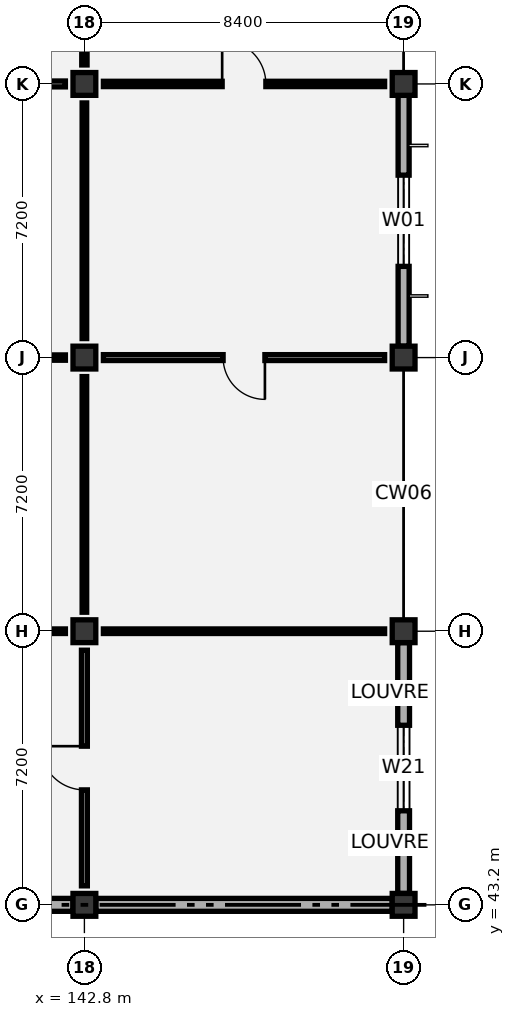
"""IFC4 building model, lengths in metres.
Left out: names, types, materials, properties, quantities, classifications, styles, units other than length and angle.
Written with IfcOpenShell. Run it as: python <this file> out.ifc"""

import sys

from ifc_helpers import new_model, si_unit, direction, frame, frame_2d, origin, origin_2d, place, context, subcontext, project, spatial, rectangle, extrude, element, fill, save


model = new_model("IFC4")
c1 = context("Model", 3, precision=1e-05, world=origin(), true_north=direction((0.0, 1.0)))
c2 = subcontext(c1, "Body", "Model", "MODEL_VIEW")
j1 = project(units=[si_unit("LENGTHUNIT", "METRE"), si_unit("PLANEANGLEUNIT", "RADIAN")], contexts=[c1])
p1 = place(None, origin())
s1 = spatial("IfcSite", under=j1, at=p1, CompositionType="ELEMENT")
p2 = place(p1, origin())
s2 = spatial("IfcBuilding", under=s1, at=p2, CompositionType="ELEMENT")
p3 = place(p2, frame((0.0, 0.0, 16.8)))
s3 = spatial("IfcBuildingStorey", under=s2, at=p3, CompositionType="ELEMENT", Elevation=16.8)
for number, where, z_axis, x_axis in (
    (1, (142.8, 43.2, 0.0), (0.0, 0.0, 1.0), (1.0, 0.0, 0.0)),
    (2, (142.8, 50.4, 0.0), (0.0, 0.0, 1.0), (1.0, 0.0, 0.0)),
    (3, (142.8, 57.6, 0.0), (0.0, 0.0, 1.0), (1.0, 0.0, 0.0)),
    (4, (142.8, 64.8, 0.0), (0.0, 0.0, 1.0), (1.0, 0.0, 0.0)),
    (5, (151.2, 43.2, 0.0), (0.0, 0.0, 1.0), (1.0, 0.0, 0.0)),
    (6, (151.2, 50.4, 0.0), (0.0, 0.0, 1.0), (1.0, 0.0, 0.0)),
    (7, (151.2, 57.6, 0.0), (0.0, 0.0, 1.0), (1.0, 0.0, 0.0)),
    (8, (151.2, 64.8, 0.0), (0.0, 0.0, 1.0), (1.0, 0.0, 0.0)),
):
    element("IfcColumn", number, at=place(p3, frame(where, z_axis=z_axis, x_axis=x_axis)), inside=s3, PredefinedType="COLUMN", context=c2, shape_type="SweptSolid", body=[
        extrude(rectangle(XDim=0.6, YDim=0.6, at=origin_2d()), origin(), (0.0, 0.0, 1.0), 5.4),
    ])
p4 = place(p3, frame((134.7, 43.2, 0.0), z_axis=(0.0, 0.0, 1.0), x_axis=(1.0, 0.0, 0.0)))
e9 = element("IfcWall", 9, at=p4, inside=s3, PredefinedType="SOLIDWALL", context=c2, shape_type="SweptSolid", body=[
    extrude(rectangle(XDim=7.8, YDim=0.34, at=frame_2d((3.9, 0.0))), origin(), (0.0, 0.0, 1.0), 4.395),
])
p5 = place(p3, frame((143.1, 43.2, 0.0), z_axis=(0.0, 0.0, 1.0), x_axis=(1.0, 0.0, 0.0)))
e10 = element("IfcWall", 10, at=p5, inside=s3, PredefinedType="SOLIDWALL", context=c2, shape_type="SweptSolid", body=[
    extrude(rectangle(XDim=7.8, YDim=0.34, at=frame_2d((3.9, 0.0))), origin(), (0.0, 0.0, 1.0), 4.395),
])
p6 = place(p3, frame((151.2, 43.5, 0.0), z_axis=(0.0, 0.0, 1.0), x_axis=(0.0, 1.0, 0.0)))
e11 = element("IfcWall", 11, at=p6, inside=s3, PredefinedType="SOLIDWALL", context=c2, shape_type="SweptSolid", body=[
    extrude(rectangle(XDim=6.6, YDim=0.31, at=frame_2d((3.3, 0.0))), origin(), (0.0, 0.0, 1.0), 4.395),
])
p7 = place(p6, frame((2.175, 0.0, 0.9)))
e12 = element("IfcOpeningElement", 12, at=p7, cuts=e11, PredefinedType="OPENING", context=c2, shape_type="SweptSolid", body=[
    extrude(rectangle(XDim=2.25, YDim=1.95, at=frame_2d((1.125, 0.975))), frame((0.0, 0.165, 0.0), z_axis=(0.0, -1.0, 0.0), x_axis=(1.0, 0.0, 0.0)), (0.0, 0.0, 1.0), 0.33),
])
p8 = place(p3, frame((151.2, 57.9, 0.0), z_axis=(0.0, 0.0, 1.0), x_axis=(0.0, 1.0, 0.0)))
e13 = element("IfcWall", 13, at=p8, inside=s3, PredefinedType="SOLIDWALL", context=c2, shape_type="SweptSolid", body=[
    extrude(rectangle(XDim=6.6, YDim=0.29, at=frame_2d((3.3, 0.0))), origin(), (0.0, 0.0, 1.0), 4.395),
])
p9 = place(p8, frame((2.1, 0.0, 0.9)))
e14 = element("IfcOpeningElement", 14, at=p9, cuts=e13, PredefinedType="OPENING", context=c2, shape_type="SweptSolid", body=[
    extrude(rectangle(XDim=2.4, YDim=1.8, at=frame_2d((1.2, 0.9))), frame((0.0, 0.155, 0.0), z_axis=(0.0, -1.0, 0.0), x_axis=(1.0, 0.0, 0.0)), (0.0, 0.0, 1.0), 0.31),
])
p10 = place(p3, frame((151.32, 43.2, 0.0), z_axis=(0.0, 0.0, 1.0), x_axis=(1.0, 0.0, 0.0)))
e15 = element("IfcWall", 15, at=p10, inside=s3, PredefinedType="PARAPET", context=c2, shape_type="SweptSolid", body=[
    extrude(rectangle(XDim=8.16, YDim=0.22, at=frame_2d((4.08, 0.0))), origin(), (0.0, 0.0, 1.0), 1.15),
])
p11 = place(p3, frame((142.8, 43.7, 0.0), z_axis=(0.0, 0.0, 1.0), x_axis=(0.0, 1.0, 0.0)))
e16 = element("IfcWall", 16, at=p11, inside=s3, PredefinedType="PARTITIONING", context=c2, shape_type="SweptSolid", body=[
    extrude(rectangle(XDim=6.2, YDim=0.155, at=frame_2d((3.1, 0.0))), origin(), (0.0, 0.0, 1.0), 4.755),
])
p12 = place(p11, frame((2.525, 0.0, 0.0)))
e17 = element("IfcOpeningElement", 17, at=p12, cuts=e16, PredefinedType="OPENING", context=c2, shape_type="SweptSolid", body=[
    extrude(rectangle(XDim=1.15, YDim=2.1, at=frame_2d((0.575, 1.05))), frame((0.0, 0.087, 0.0), z_axis=(0.0, -1.0, 0.0), x_axis=(1.0, 0.0, 0.0)), (0.0, 0.0, 1.0), 0.175),
])
p13 = place(p3, frame((134.9, 50.4, 0.0), z_axis=(0.0, 0.0, 1.0), x_axis=(1.0, 0.0, 0.0)))
e18 = element("IfcWall", 18, at=p13, inside=s3, PredefinedType="PARTITIONING", context=c2, shape_type="SweptSolid", body=[
    extrude(rectangle(XDim=7.4, YDim=0.12, at=frame_2d((3.7, 0.0))), origin(), (0.0, 0.0, 1.0), 4.295),
])
p14 = place(p3, frame((142.8, 50.9, 0.0), z_axis=(0.0, 0.0, 1.0), x_axis=(0.0, 1.0, 0.0)))
e19 = element("IfcWall", 19, at=p14, inside=s3, PredefinedType="PARTITIONING", context=c2, shape_type="SweptSolid", body=[
    extrude(rectangle(XDim=6.2, YDim=0.12, at=frame_2d((3.1, 0.0))), origin(), (0.0, 0.0, 1.0), 4.345),
])
p15 = place(p3, frame((134.9, 57.6, 0.0), z_axis=(0.0, 0.0, 1.0), x_axis=(1.0, 0.0, 0.0)))
e20 = element("IfcWall", 20, at=p15, inside=s3, PredefinedType="PARTITIONING", context=c2, shape_type="SweptSolid", body=[
    extrude(rectangle(XDim=7.4, YDim=0.14, at=frame_2d((3.7, 0.0))), origin(), (0.0, 0.0, 1.0), 4.295),
])
p16 = place(p15, frame((3.15, 0.0, 0.0)))
e21 = element("IfcOpeningElement", 21, at=p16, cuts=e20, PredefinedType="OPENING", context=c2, shape_type="SweptSolid", body=[
    extrude(rectangle(XDim=1.1, YDim=2.1, at=frame_2d((0.55, 1.05))), frame((0.0, 0.08, 0.0), z_axis=(0.0, -1.0, 0.0), x_axis=(1.0, 0.0, 0.0)), (0.0, 0.0, 1.0), 0.16),
])
p17 = place(p3, frame((142.8, 58.1, 0.0), z_axis=(0.0, 0.0, 1.0), x_axis=(0.0, 1.0, 0.0)))
e22 = element("IfcWall", 22, at=p17, inside=s3, PredefinedType="PARTITIONING", context=c2, shape_type="SweptSolid", body=[
    extrude(rectangle(XDim=6.2, YDim=0.12, at=frame_2d((3.1, 0.0))), origin(), (0.0, 0.0, 1.0), 4.545),
])
p18 = place(p3, frame((134.9, 64.8, 0.0), z_axis=(0.0, 0.0, 1.0), x_axis=(1.0, 0.0, 0.0)))
e23 = element("IfcWall", 23, at=p18, inside=s3, PredefinedType="PARTITIONING", context=c2, shape_type="SweptSolid", body=[
    extrude(rectangle(XDim=7.4, YDim=0.155, at=frame_2d((3.7, 0.0))), origin(), (0.0, 0.0, 1.0), 4.295),
])
p19 = place(p18, frame((3.125, 0.0, 0.0)))
e24 = element("IfcOpeningElement", 24, at=p19, cuts=e23, PredefinedType="OPENING", context=c2, shape_type="SweptSolid", body=[
    extrude(rectangle(XDim=1.15, YDim=2.1, at=frame_2d((0.575, 1.05))), frame((0.0, 0.087, 0.0), z_axis=(0.0, -1.0, 0.0), x_axis=(1.0, 0.0, 0.0)), (0.0, 0.0, 1.0), 0.175),
])
p20 = place(p3, frame((142.8, 65.3, 0.0), z_axis=(0.0, 0.0, 1.0), x_axis=(0.0, 1.0, 0.0)))
e25 = element("IfcWall", 25, at=p20, inside=s3, PredefinedType="PARTITIONING", context=c2, shape_type="SweptSolid", body=[
    extrude(rectangle(XDim=6.2, YDim=0.14, at=frame_2d((3.1, 0.0))), origin(), (0.0, 0.0, 1.0), 4.345),
])
p21 = place(p20, frame((2.55, 0.0, 0.0)))
e26 = element("IfcOpeningElement", 26, at=p21, cuts=e25, PredefinedType="OPENING", context=c2, shape_type="SweptSolid", body=[
    extrude(rectangle(XDim=1.1, YDim=2.1, at=frame_2d((0.55, 1.05))), frame((0.0, 0.08, 0.0), z_axis=(0.0, -1.0, 0.0), x_axis=(1.0, 0.0, 0.0)), (0.0, 0.0, 1.0), 0.16),
])
p22 = place(p3, frame((143.3, 50.4, 0.0), z_axis=(0.0, 0.0, 1.0), x_axis=(1.0, 0.0, 0.0)))
e27 = element("IfcWall", 27, at=p22, inside=s3, PredefinedType="PARTITIONING", context=c2, shape_type="SweptSolid", body=[
    extrude(rectangle(XDim=7.4, YDim=0.12, at=frame_2d((3.7, 0.0))), origin(), (0.0, 0.0, 1.0), 4.295),
])
p23 = place(p3, frame((143.3, 57.6, 0.0), z_axis=(0.0, 0.0, 1.0), x_axis=(1.0, 0.0, 0.0)))
e28 = element("IfcWall", 28, at=p23, inside=s3, PredefinedType="PARTITIONING", context=c2, shape_type="SweptSolid", body=[
    extrude(rectangle(XDim=7.4, YDim=0.155, at=frame_2d((3.7, 0.0))), origin(), (0.0, 0.0, 1.0), 4.295),
])
p24 = place(p23, frame((3.15, 0.0, 0.0)))
e29 = element("IfcOpeningElement", 29, at=p24, cuts=e28, PredefinedType="OPENING", context=c2, shape_type="SweptSolid", body=[
    extrude(rectangle(XDim=1.1, YDim=2.1, at=frame_2d((0.55, 1.05))), frame((0.0, 0.087, 0.0), z_axis=(0.0, -1.0, 0.0), x_axis=(1.0, 0.0, 0.0)), (0.0, 0.0, 1.0), 0.175),
])
p25 = place(p3, frame((143.3, 64.8, 0.0), z_axis=(0.0, 0.0, 1.0), x_axis=(1.0, 0.0, 0.0)))
e30 = element("IfcWall", 30, at=p25, inside=s3, PredefinedType="PARTITIONING", context=c2, shape_type="SweptSolid", body=[
    extrude(rectangle(XDim=7.4, YDim=0.14, at=frame_2d((3.7, 0.0))), origin(), (0.0, 0.0, 1.0), 4.295),
])
p26 = place(p25, frame((3.125, 0.0, 0.0)))
e31 = element("IfcOpeningElement", 31, at=p26, cuts=e30, PredefinedType="OPENING", context=c2, shape_type="SweptSolid", body=[
    extrude(rectangle(XDim=1.15, YDim=2.1, at=frame_2d((0.575, 1.05))), frame((0.0, 0.08, 0.0), z_axis=(0.0, -1.0, 0.0), x_axis=(1.0, 0.0, 0.0)), (0.0, 0.0, 1.0), 0.16),
])
p27 = place(p7, origin())
e32 = element("IfcWindow", 32, at=p27, inside=s3, PartitioningType="SINGLE_PANEL", PredefinedType="WINDOW", context=c2, shape_type="SweptSolid", body=[
    extrude(rectangle(XDim=2.25, YDim=1.95, at=frame_2d((1.125, 0.975))), frame((0.0, 0.03, 0.0), z_axis=(0.0, -1.0, 0.0), x_axis=(1.0, 0.0, 0.0)), (0.0, 0.0, 1.0), 0.06),
])
fill(e12, e32)
p28 = place(p9, origin())
e33 = element("IfcWindow", 33, at=p28, inside=s3, PartitioningType="SINGLE_PANEL", PredefinedType="WINDOW", context=c2, shape_type="SweptSolid", body=[
    extrude(rectangle(XDim=2.4, YDim=1.8, at=frame_2d((1.2, 0.9))), frame((0.0, 0.03, 0.0), z_axis=(0.0, -1.0, 0.0), x_axis=(1.0, 0.0, 0.0)), (0.0, 0.0, 1.0), 0.06),
])
fill(e14, e33)
p29 = place(p12, origin())
e34 = element("IfcDoor", 34, at=p29, inside=s3, OperationType="SINGLE_SWING_RIGHT", PredefinedType="DOOR", context=c2, shape_type="SweptSolid", body=[
    extrude(rectangle(XDim=1.15, YDim=2.1, at=frame_2d((0.575, 1.05))), frame((0.0, 0.025, 0.0), z_axis=(0.0, -1.0, 0.0), x_axis=(1.0, 0.0, 0.0)), (0.0, 0.0, 1.0), 0.05),
])
fill(e17, e34)
p30 = place(p24, frame((1.1, 0.0, 0.0), z_axis=(0.0, 0.0, 1.0), x_axis=(-1.0, 0.0, 0.0)))
e35 = element("IfcDoor", 35, at=p30, inside=s3, OperationType="SINGLE_SWING_LEFT", PredefinedType="DOOR", context=c2, shape_type="SweptSolid", body=[
    extrude(rectangle(XDim=1.1, YDim=2.1, at=frame_2d((0.55, 1.05))), frame((0.0, 0.025, 0.0), z_axis=(0.0, -1.0, 0.0), x_axis=(1.0, 0.0, 0.0)), (0.0, 0.0, 1.0), 0.05),
])
fill(e29, e35)
p31 = place(p26, origin())
e36 = element("IfcDoor", 36, at=p31, inside=s3, OperationType="SINGLE_SWING_LEFT", PredefinedType="DOOR", context=c2, shape_type="SweptSolid", body=[
    extrude(rectangle(XDim=1.15, YDim=2.1, at=frame_2d((0.575, 1.05))), frame((0.0, 0.025, 0.0), z_axis=(0.0, -1.0, 0.0), x_axis=(1.0, 0.0, 0.0)), (0.0, 0.0, 1.0), 0.05),
])
fill(e31, e36)
save(model, sys.argv[1])
